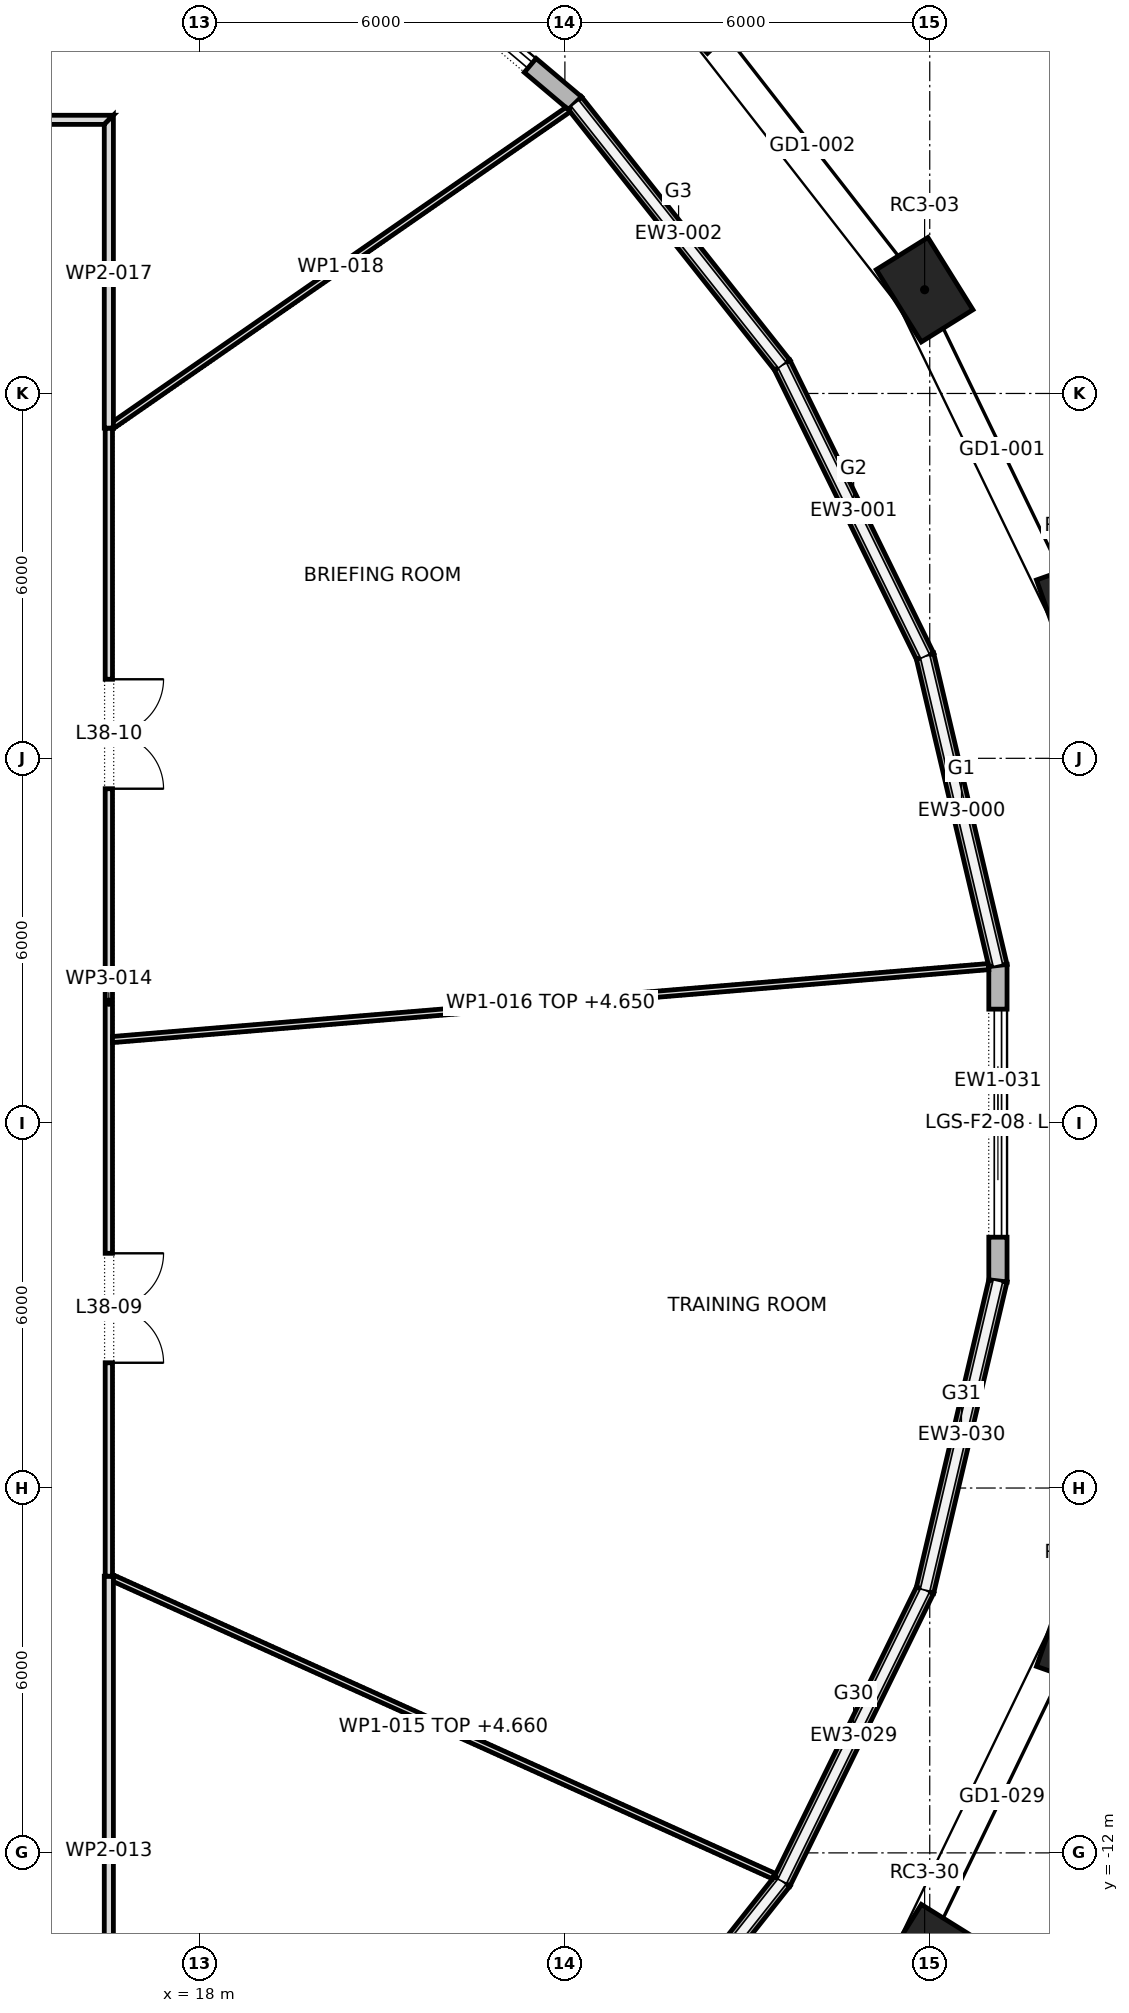
"""IFC4 building model, lengths in metres.
Left out: names, types, materials, properties, quantities, classifications, styles, units other than length and angle.
Written with IfcOpenShell. Run it as: python <this file> out.ifc"""

import sys

from ifc_helpers import new_model, si_unit, direction, frame, frame_2d, origin, origin_2d, place, context, subcontext, project, spatial, polyline, rectangle, outline, extrude, element, fill, save


model = new_model("IFC4")
c1 = context("Model", 3, precision=1e-05, world=origin(), true_north=direction((0.0, 1.0)))
c2 = subcontext(c1, "Body", "Model", "MODEL_VIEW")
j1 = project(units=[si_unit("LENGTHUNIT", "METRE"), si_unit("PLANEANGLEUNIT", "RADIAN")], contexts=[c1])
p1 = place(None, origin())
s1 = spatial("IfcSite", under=j1, at=p1, CompositionType="ELEMENT")
p2 = place(p1, origin())
s2 = spatial("IfcBuilding", under=s1, at=p2, CompositionType="ELEMENT")
p3 = place(p2, frame((0.0, 0.0, 167.5)))
s3 = spatial("IfcBuildingStorey", under=s2, at=p3, CompositionType="ELEMENT", Elevation=167.5)
for number, where, z_axis, x_axis in (
    (1, (32.46, 8.44, 0.0), (0.0, 0.0, 1.0), (-0.334, 0.943, 0.0)),
    (2, (29.916, 13.706, 0.0), (0.0, 0.0, 1.0), (-0.529, 0.849, 0.0)),
    (3, (26.221, 18.445, 0.0), (0.0, 0.0, 1.0), (-0.692, 0.722, 0.0)),
    (4, (29.916, -13.706, 0.0), (0.0, 0.0, 1.0), (0.529, 0.849, 0.0)),
    (5, (32.46, -8.44, 0.0), (0.0, 0.0, 1.0), (0.334, 0.943, 0.0)),
):
    element("IfcColumn", number, at=place(p3, frame(where, z_axis=z_axis, x_axis=x_axis)), inside=s3, PredefinedType="COLUMN", context=c2, shape_type="SweptSolid", body=[
        extrude(rectangle(XDim=1.4, YDim=1.0, at=origin_2d()), origin(), (0.0, 0.0, 1.0), 6.0),
    ])
p4 = place(p3, frame((31.121, 2.593, 5.2), z_axis=(0.0, 0.0, 1.0), x_axis=(-0.229297175564, 0.973356463624, 0.0)))
e6 = element("IfcWall", 6, at=p4, inside=s3, PredefinedType="STANDARD", context=c2, shape_type="SweptSolid", body=[
    extrude(outline(polyline([(-0.017, -0.15), (5.241, -0.15), (5.208, 0.15), (0.017, 0.15), (-0.017, -0.15)])), origin(), (0.0, 0.0, 1.0), 0.45),
])
p5 = place(p3, frame((29.923, 7.678, 5.2), z_axis=(0.0, 0.0, 1.0), x_axis=(-0.440444485575, 0.897779847806, 0.0)))
e7 = element("IfcWall", 7, at=p5, inside=s3, PredefinedType="STANDARD", context=c2, shape_type="SweptSolid", body=[
    extrude(outline(polyline([(-0.017, -0.15), (5.35, -0.15), (5.317, 0.15), (0.017, 0.15), (-0.017, -0.15)])), origin(), (0.0, 0.0, 1.0), 0.45),
])
p6 = place(p3, frame((27.574, 12.467, 5.2), z_axis=(0.0, 0.0, 1.0), x_axis=(-0.620577705153, 0.784144955902, 0.0)))
e8 = element("IfcWall", 8, at=p6, inside=s3, PredefinedType="STANDARD", context=c2, shape_type="SweptSolid", body=[
    extrude(outline(polyline([(-0.016, -0.15), (5.508, -0.15), (5.478, 0.15), (0.016, 0.15), (-0.016, -0.15)])), origin(), (0.0, 0.0, 1.0), 0.45),
])
p7 = place(p3, frame((24.165, 16.774, 0.0), z_axis=(0.0, 0.0, 1.0), x_axis=(-0.764076096085, 0.645126126732, 0.0)))
e9 = element("IfcWall", 9, at=p7, inside=s3, PredefinedType="STANDARD", context=c2, shape_type="SweptSolid", body=[
    extrude(outline(polyline([(-0.015, -0.15), (5.689, -0.15), (5.661, 0.15), (0.015, 0.15), (-0.015, -0.15)])), origin(), (0.0, 0.0, 1.0), 5.65),
])
p8 = place(p7, frame((0.962, 0.0, 0.0)))
e10 = element("IfcOpeningElement", 10, at=p8, cuts=e9, PredefinedType="OPENING", context=c2, shape_type="SweptSolid", body=[
    extrude(rectangle(XDim=3.75, YDim=5.2, at=frame_2d((1.875, 2.6))), frame((0.0, 0.162, 0.0), z_axis=(0.0, -1.0, 0.0), x_axis=(1.0, 0.0, 0.0)), (0.0, 0.0, 1.0), 0.324),
])
p9 = place(p3, frame((24.165, -16.774, 5.2), z_axis=(0.0, 0.0, 1.0), x_axis=(0.620577705153, 0.784144955902, 0.0)))
e11 = element("IfcWall", 11, at=p9, inside=s3, PredefinedType="STANDARD", context=c2, shape_type="SweptSolid", body=[
    extrude(outline(polyline([(-0.015, -0.15), (5.509, -0.15), (5.477, 0.15), (0.015, 0.15), (-0.015, -0.15)])), origin(), (0.0, 0.0, 1.0), 0.45),
])
p10 = place(p3, frame((27.574, -12.467, 5.2), z_axis=(0.0, 0.0, 1.0), x_axis=(0.440444485575, 0.897779847806, 0.0)))
e12 = element("IfcWall", 12, at=p10, inside=s3, PredefinedType="STANDARD", context=c2, shape_type="SweptSolid", body=[
    extrude(outline(polyline([(-0.016, -0.15), (5.35, -0.15), (5.317, 0.15), (0.016, 0.15), (-0.016, -0.15)])), origin(), (0.0, 0.0, 1.0), 0.45),
])
p11 = place(p3, frame((29.923, -7.678, 5.2), z_axis=(0.0, 0.0, 1.0), x_axis=(0.229297175564, 0.973356463624, 0.0)))
e13 = element("IfcWall", 13, at=p11, inside=s3, PredefinedType="STANDARD", context=c2, shape_type="SweptSolid", body=[
    extrude(outline(polyline([(-0.017, -0.15), (5.242, -0.15), (5.207, 0.15), (0.017, 0.15), (-0.017, -0.15)])), origin(), (0.0, 0.0, 1.0), 0.45),
])
p12 = place(p3, frame((31.121, -2.593, 0.0), z_axis=(0.0, 0.0, 1.0), x_axis=(0.0, 1.0, 0.0)))
e14 = element("IfcWall", 14, at=p12, inside=s3, PredefinedType="STANDARD", context=c2, shape_type="SweptSolid", body=[
    extrude(outline(polyline([(-0.017, -0.15), (5.203, -0.15), (5.168, 0.15), (0.017, 0.15), (-0.017, -0.15)])), origin(), (0.0, 0.0, 1.0), 5.65),
])
p13 = place(p12, frame((0.718, 0.0, 0.0)))
e15 = element("IfcOpeningElement", 15, at=p13, cuts=e14, PredefinedType="OPENING", context=c2, shape_type="SweptSolid", body=[
    extrude(rectangle(XDim=3.75, YDim=5.2, at=frame_2d((1.875, 2.6))), frame((0.0, 0.162, 0.0), z_axis=(0.0, -1.0, 0.0), x_axis=(1.0, 0.0, 0.0)), (0.0, 0.0, 1.0), 0.324),
])
p14 = place(p3, frame((-16.575, 16.5, 0.0), z_axis=(0.0, 0.0, 1.0), x_axis=(1.0, 0.0, 0.0)))
e16 = element("IfcWall", 16, at=p14, inside=s3, PredefinedType="PARTITIONING", context=c2, shape_type="SweptSolid", body=[
    extrude(outline(polyline([(0.15, -0.075), (2.082, -0.075), (4.015, -0.075), (5.947, -0.075), (7.879, -0.075), (9.812, -0.075), (11.744, -0.075), (13.677, -0.075), (15.609, -0.075), (17.541, -0.075), (19.473, -0.075), (21.406, -0.075), (23.338, -0.075), (25.271, -0.075), (27.203, -0.075), (29.135, -0.075), (31.068, -0.075), (33.0, -0.075), (33.15, 0.075), (31.2, 0.075), (29.25, 0.075), (27.3, 0.075), (25.35, 0.075), (23.4, 0.075), (21.45, 0.075), (19.5, 0.075), (17.55, 0.075), (15.6, 0.075), (13.65, 0.075), (11.7, 0.075), (9.75, 0.075), (7.8, 0.075), (5.85, 0.075), (3.9, 0.075), (1.95, 0.075), (0.0, 0.075), (0.15, -0.075)])), origin(), (0.0, 0.0, 1.0), 5.65),
])
p15 = place(p14, frame((27.29, 0.0, 0.0)))
e17 = element("IfcOpeningElement", 17, at=p15, cuts=e16, PredefinedType="OPENING", context=c2, shape_type="SweptSolid", body=[
    extrude(rectangle(XDim=1.0, YDim=2.1, at=frame_2d((0.5, 1.05))), frame((0.0, 0.087, 0.0), z_axis=(0.0, -1.0, 0.0), x_axis=(1.0, 0.0, 0.0)), (0.0, 0.0, 1.0), 0.174),
])
p16 = place(p14, frame((16.075, 0.0, 0.0)))
e18 = element("IfcOpeningElement", 18, at=p16, cuts=e16, PredefinedType="OPENING", context=c2, shape_type="SweptSolid", body=[
    extrude(rectangle(XDim=1.0, YDim=2.1, at=frame_2d((0.5, 1.05))), frame((0.0, 0.087, 0.0), z_axis=(0.0, -1.0, 0.0), x_axis=(1.0, 0.0, 0.0)), (0.0, 0.0, 1.0), 0.174),
])
p17 = place(p14, frame((5.09, 0.0, 0.0)))
e19 = element("IfcOpeningElement", 19, at=p17, cuts=e16, PredefinedType="OPENING", context=c2, shape_type="SweptSolid", body=[
    extrude(rectangle(XDim=1.0, YDim=2.1, at=frame_2d((0.5, 1.05))), frame((0.0, 0.087, 0.0), z_axis=(0.0, -1.0, 0.0), x_axis=(1.0, 0.0, 0.0)), (0.0, 0.0, 1.0), 0.174),
])
p18 = place(p3, frame((16.5, -7.45, 0.0), z_axis=(0.0, 0.0, 1.0), x_axis=(0.0, -1.0, 0.0)))
e20 = element("IfcWall", 20, at=p18, inside=s3, PredefinedType="PARTITIONING", context=c2, shape_type="SweptSolid", body=[
    extrude(outline(polyline([(0.0, -0.075), (1.795, -0.075), (3.59, -0.075), (5.385, -0.075), (7.18, -0.075), (8.975, -0.075), (9.125, 0.075), (7.3, 0.075), (5.475, 0.075), (3.65, 0.075), (1.825, 0.075), (0.0, 0.075), (0.0, -0.075)])), origin(), (0.0, 0.0, 1.0), 5.65),
])
p19 = place(p3, frame((16.5, -7.45, 0.0), z_axis=(0.0, 0.0, 1.0), x_axis=(0.0, 1.0, 0.0)))
e21 = element("IfcWall", 21, at=p19, inside=s3, PredefinedType="PARTITIONING", context=c2, shape_type="SweptSolid", body=[
    extrude(rectangle(XDim=18.88, YDim=0.12, at=frame_2d((9.44, 0.0))), origin(), (0.0, 0.0, 1.0), 5.65),
])
p20 = place(p19, frame((3.51, 0.0, 0.0)))
e22 = element("IfcOpeningElement", 22, at=p20, cuts=e21, PredefinedType="OPENING", context=c2, shape_type="SweptSolid", body=[
    extrude(rectangle(XDim=1.8, YDim=2.1, at=frame_2d((0.9, 1.05))), frame((0.0, 0.072, 0.0), z_axis=(0.0, -1.0, 0.0), x_axis=(1.0, 0.0, 0.0)), (0.0, 0.0, 1.0), 0.144),
])
p21 = place(p19, frame((12.95, 0.0, 0.0)))
e23 = element("IfcOpeningElement", 23, at=p21, cuts=e21, PredefinedType="OPENING", context=c2, shape_type="SweptSolid", body=[
    extrude(rectangle(XDim=1.8, YDim=2.1, at=frame_2d((0.9, 1.05))), frame((0.0, 0.072, 0.0), z_axis=(0.0, -1.0, 0.0), x_axis=(1.0, 0.0, 0.0)), (0.0, 0.0, 1.0), 0.144),
])
p22 = place(p3, frame((16.54, -7.468, 0.0), z_axis=(0.0, 0.0, 1.0), x_axis=(0.911586306474, -0.411108751851, 0.0)))
e24 = element("IfcWall", 24, at=p22, inside=s3, PredefinedType="PARTITIONING", context=c2, shape_type="SweptSolid", body=[
    extrude(outline(polyline([(0.0, 0.05), (0.0, 0.049), (0.011, 0.025), (0.025, 0.031), (0.061, -0.05), (2.042, -0.05), (4.024, -0.05), (6.005, -0.05), (7.986, -0.05), (9.968, -0.05), (11.949, -0.05), (11.949, 0.05), (9.958, 0.05), (7.966, 0.05), (5.975, 0.05), (3.983, 0.05), (1.991, 0.05), (0.0, 0.05)])), origin(), (0.0, 0.0, 1.0), 4.66),
])
p23 = place(p3, frame((16.556, 1.375, 0.0), z_axis=(0.0, 0.0, 1.0), x_axis=(0.996550995981, 0.082982603054, 0.0)))
e25 = element("IfcWall", 25, at=p23, inside=s3, PredefinedType="PARTITIONING", context=c2, shape_type="SweptSolid", body=[
    extrude(outline(polyline([(14.46, -0.05), (14.46, 0.031), (14.457, 0.05), (12.651, 0.05), (10.845, 0.05), (9.039, 0.05), (7.232, 0.05), (5.426, 0.05), (3.62, 0.05), (1.814, 0.05), (0.008, 0.05), (0.0, -0.043), (0.0, -0.05), (1.808, -0.05), (3.615, -0.05), (5.423, -0.05), (7.23, -0.05), (9.038, -0.05), (10.845, -0.05), (12.653, -0.05), (14.46, -0.05)])), origin(), (0.0, 0.0, 1.0), 4.65),
])
p24 = place(p3, frame((16.5, 16.575, 0.0), z_axis=(0.0, 0.0, 1.0), x_axis=(0.0, -1.0, 0.0)))
e26 = element("IfcWall", 26, at=p24, inside=s3, PredefinedType="PARTITIONING", context=c2, shape_type="SweptSolid", body=[
    extrude(outline(polyline([(5.145, 0.075), (3.43, 0.075), (1.715, 0.075), (0.0, 0.075), (0.15, -0.075), (1.815, -0.075), (3.48, -0.075), (5.145, -0.075), (5.145, 0.075)])), origin(), (0.0, 0.0, 1.0), 5.65),
])
p25 = place(p3, frame((24.058, 16.672, 0.0), z_axis=(0.0, 0.0, 1.0), x_axis=(-0.821707329214, -0.56990969909, 0.0)))
e27 = element("IfcWall", 27, at=p25, inside=s3, PredefinedType="PARTITIONING", context=c2, shape_type="SweptSolid", body=[
    extrude(outline(polyline([(0.017, -0.05), (1.828, -0.05), (3.639, -0.05), (5.45, -0.05), (7.261, -0.05), (9.072, -0.05), (9.136, 0.043), (9.149, 0.034), (9.16, 0.05), (9.16, 0.05), (7.328, 0.05), (5.496, 0.05), (3.664, 0.05), (1.832, 0.05), (0.0, 0.05), (0.0, 0.048), (0.003, 0.002), (0.017, -0.05)])), origin(), (0.0, 0.0, 1.0), 5.65),
])
p26 = place(p8, origin())
e28 = element("IfcDoor", 28, at=p26, inside=s3, OperationType="DOUBLE_DOOR_SLIDING", PredefinedType="DOOR", context=c2, shape_type="SweptSolid", body=[
    extrude(rectangle(XDim=3.75, YDim=5.2, at=frame_2d((1.875, 2.6))), frame((0.0, 0.025, 0.0), z_axis=(0.0, -1.0, 0.0), x_axis=(1.0, 0.0, 0.0)), (0.0, 0.0, 1.0), 0.05),
])
fill(e10, e28)
p27 = place(p13, origin())
e29 = element("IfcDoor", 29, at=p27, inside=s3, OperationType="DOUBLE_DOOR_SLIDING", PredefinedType="DOOR", context=c2, shape_type="SweptSolid", body=[
    extrude(rectangle(XDim=3.75, YDim=5.2, at=frame_2d((1.875, 2.6))), frame((0.0, 0.025, 0.0), z_axis=(0.0, -1.0, 0.0), x_axis=(1.0, 0.0, 0.0)), (0.0, 0.0, 1.0), 0.05),
])
fill(e15, e29)
p28 = place(p20, frame((1.8, 0.0, 0.0), z_axis=(0.0, 0.0, 1.0), x_axis=(-1.0, 0.0, 0.0)))
e30 = element("IfcDoor", 30, at=p28, inside=s3, OperationType="DOUBLE_DOOR_SINGLE_SWING", PredefinedType="DOOR", context=c2, shape_type="SweptSolid", body=[
    extrude(rectangle(XDim=1.8, YDim=2.1, at=frame_2d((0.9, 1.05))), frame((0.0, 0.025, 0.0), z_axis=(0.0, -1.0, 0.0), x_axis=(1.0, 0.0, 0.0)), (0.0, 0.0, 1.0), 0.05),
])
fill(e22, e30)
p29 = place(p21, frame((1.8, 0.0, 0.0), z_axis=(0.0, 0.0, 1.0), x_axis=(-1.0, 0.0, 0.0)))
e31 = element("IfcDoor", 31, at=p29, inside=s3, OperationType="DOUBLE_DOOR_SINGLE_SWING", PredefinedType="DOOR", context=c2, shape_type="SweptSolid", body=[
    extrude(rectangle(XDim=1.8, YDim=2.1, at=frame_2d((0.9, 1.05))), frame((0.0, 0.025, 0.0), z_axis=(0.0, -1.0, 0.0), x_axis=(1.0, 0.0, 0.0)), (0.0, 0.0, 1.0), 0.05),
])
fill(e23, e31)
save(model, sys.argv[1])
